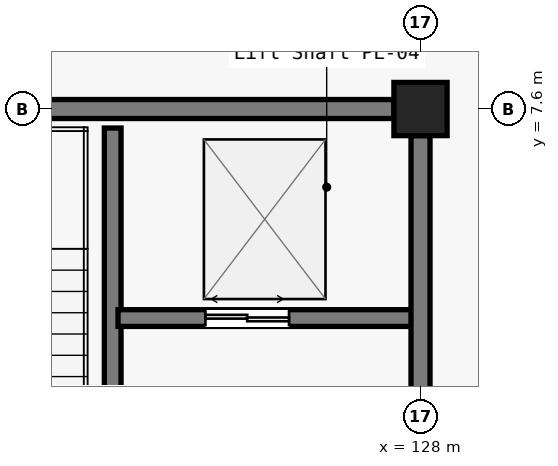
"""IFC4 building model, lengths in metres.
Left out: names, types, materials, properties, quantities, classifications, styles, units other than length and angle.
Written with IfcOpenShell. Run it as: python <this file> out.ifc"""

import sys

from ifc_helpers import new_model, si_unit, direction, frame, frame_2d, origin, origin_2d, place, context, subcontext, project, spatial, rectangle, extrude, element, fill, save


model = new_model("IFC4")
c1 = context("Model", 3, precision=1e-05, world=origin(), true_north=direction((0.0, 1.0)))
c2 = subcontext(c1, "Body", "Model", "MODEL_VIEW")
j1 = project(units=[si_unit("LENGTHUNIT", "METRE"), si_unit("PLANEANGLEUNIT", "RADIAN")], contexts=[c1])
p1 = place(None, origin())
s1 = spatial("IfcSite", under=j1, at=p1, CompositionType="ELEMENT")
p2 = place(p1, origin())
s2 = spatial("IfcBuilding", under=s1, at=p2, CompositionType="ELEMENT")
p3 = place(p2, frame((0.0, 0.0, -5.4)))
s3 = spatial("IfcBuildingStorey", under=s2, at=p3, CompositionType="ELEMENT", Elevation=-5.4)
p4 = place(p3, frame((128.0, 7.6, 0.0), z_axis=(0.0, 0.0, 1.0), x_axis=(1.0, 0.0, 0.0)))
e1 = element("IfcColumn", 1, at=p4, inside=s3, PredefinedType="COLUMN", context=c2, shape_type="SweptSolid", body=[
    extrude(rectangle(XDim=0.7, YDim=0.7, at=origin_2d()), origin(), (0.0, 0.0, 1.0), 5.4),
])
p5 = place(p3, frame((120.4, 7.6, 0.0), z_axis=(0.0, 0.0, 1.0), x_axis=(1.0, 0.0, 0.0)))
e2 = element("IfcWall", 2, at=p5, inside=s3, PredefinedType="SOLIDWALL", context=c2, shape_type="SweptSolid", body=[
    extrude(rectangle(XDim=7.25, YDim=0.25, at=frame_2d((3.625, 0.0))), origin(), (0.0, 0.0, 1.0), 4.205),
])
p6 = place(p3, frame((123.95, 0.25, 0.0), z_axis=(0.0, 0.0, 1.0), x_axis=(0.0, 1.0, 0.0)))
e3 = element("IfcWall", 3, at=p6, inside=s3, PredefinedType="SOLIDWALL", context=c2, shape_type="SweptSolid", body=[
    extrude(rectangle(XDim=7.1, YDim=0.22, at=frame_2d((3.55, 0.0))), origin(), (0.0, 0.0, 1.0), 5.08),
])
p7 = place(p6, frame((0.35, 0.0, 0.0)))
e4 = element("IfcOpeningElement", 4, at=p7, cuts=e3, PredefinedType="OPENING", context=c2, shape_type="SweptSolid", body=[
    extrude(rectangle(XDim=1.2, YDim=2.15, at=frame_2d((0.6, 1.075))), frame((0.0, 0.12, 0.0), z_axis=(0.0, -1.0, 0.0), x_axis=(1.0, 0.0, 0.0)), (0.0, 0.0, 1.0), 0.24),
])
p8 = place(p3, frame((124.02, 4.85, 0.0), z_axis=(0.0, 0.0, 1.0), x_axis=(1.0, 0.0, 0.0)))
e5 = element("IfcWall", 5, at=p8, inside=s3, PredefinedType="SOLIDWALL", context=c2, shape_type="SweptSolid", body=[
    extrude(rectangle(XDim=3.93, YDim=0.22, at=frame_2d((1.965, 0.0))), origin(), (0.0, 0.0, 1.0), 4.38),
])
p9 = place(p8, frame((1.15, 0.0, 0.0)))
e6 = element("IfcOpeningElement", 6, at=p9, cuts=e5, PredefinedType="OPENING", context=c2, shape_type="SweptSolid", body=[
    extrude(rectangle(XDim=1.1, YDim=2.2, at=frame_2d((0.55, 1.1))), frame((0.0, 0.12, 0.0), z_axis=(0.0, -1.0, 0.0), x_axis=(1.0, 0.0, 0.0)), (0.0, 0.0, 1.0), 0.24),
])
p10 = place(p3, frame((128.0, 0.4, 0.0), z_axis=(0.0, 0.0, 1.0), x_axis=(0.0, 1.0, 0.0)))
e7 = element("IfcWall", 7, at=p10, inside=s3, PredefinedType="SOLIDWALL", context=c2, shape_type="SweptSolid", body=[
    extrude(rectangle(XDim=6.85, YDim=0.25, at=frame_2d((3.425, 0.0))), origin(), (0.0, 0.0, 1.0), 4.205),
])
p11 = place(p10, frame((1.95, 0.0, 0.0)))
e8 = element("IfcOpeningElement", 8, at=p11, cuts=e7, PredefinedType="OPENING", context=c2, shape_type="SweptSolid", body=[
    extrude(rectangle(XDim=1.35, YDim=2.2, at=frame_2d((0.675, 1.1))), frame((0.0, 0.135, 0.0), z_axis=(0.0, -1.0, 0.0), x_axis=(1.0, 0.0, 0.0)), (0.0, 0.0, 1.0), 0.27),
])
p12 = place(p9, origin())
e9 = element("IfcDoor", 9, at=p12, inside=s3, OperationType="DOUBLE_DOOR_SLIDING", PredefinedType="DOOR", context=c2, shape_type="SweptSolid", body=[
    extrude(rectangle(XDim=1.1, YDim=2.2, at=frame_2d((0.55, 1.1))), frame((0.0, 0.025, 0.0), z_axis=(0.0, -1.0, 0.0), x_axis=(1.0, 0.0, 0.0)), (0.0, 0.0, 1.0), 0.05),
])
fill(e6, e9)
save(model, sys.argv[1])
